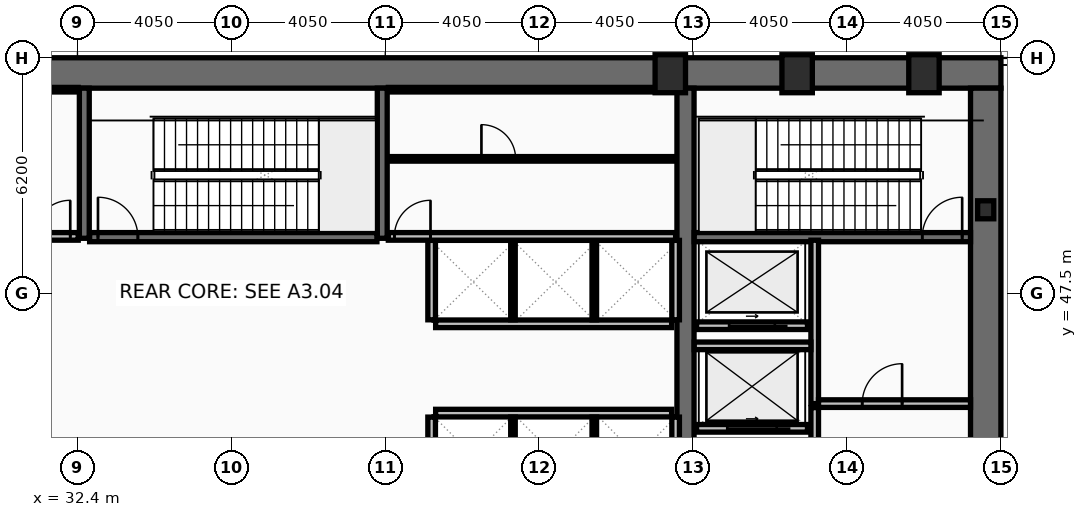
"""IFC4 building model, lengths in metres.
Left out: names, types, materials, properties, quantities, classifications, styles, units other than length and angle.
Written with IfcOpenShell. Run it as: python <this file> out.ifc"""

import sys

from ifc_helpers import new_model, si_unit, direction, frame, frame_2d, origin, origin_2d, place, context, subcontext, project, spatial, rectangle, hollow_rectangle, i_section, extrude, element, fill, save


model = new_model("IFC4")
c1 = context("Model", 3, precision=1e-05, world=origin(), true_north=direction((0.0, 1.0)))
c2 = subcontext(c1, "Body", "Model", "MODEL_VIEW")
j1 = project(units=[si_unit("LENGTHUNIT", "METRE"), si_unit("PLANEANGLEUNIT", "RADIAN")], contexts=[c1])
p1 = place(None, origin())
s1 = spatial("IfcSite", under=j1, at=p1, CompositionType="ELEMENT")
p2 = place(p1, origin())
s2 = spatial("IfcBuilding", under=s1, at=p2, CompositionType="ELEMENT")
p3 = place(p2, frame((0.0, 0.0, 20.4)))
s3 = spatial("IfcBuildingStorey", under=s2, at=p3, CompositionType="ELEMENT", Elevation=20.4)
p4 = place(p3, frame((16.2, 53.3, 0.0), z_axis=(0.0, 0.0, 1.0), x_axis=(1.0, 0.0, 0.0)))
e1 = element("IfcWall", 1, at=p4, inside=s3, PredefinedType="SHEAR", context=c2, shape_type="SweptSolid", body=[
    extrude(rectangle(XDim=40.5, YDim=0.8, at=frame_2d((20.25, 0.0))), origin(), (0.0, 0.0, 1.0), 5.22),
])
p5 = place(p3, frame((56.3, 52.9, 0.0), z_axis=(0.0, 0.0, 1.0), x_axis=(0.0, -1.0, 0.0)))
e2 = element("IfcWall", 2, at=p5, inside=s3, PredefinedType="SHEAR", context=c2, shape_type="SweptSolid", body=[
    extrude(rectangle(XDim=10.8, YDim=0.8, at=frame_2d((5.4, 0.0))), origin(), (0.0, 0.0, 1.0), 5.22),
])
p6 = place(p3, frame((48.4, 42.1, 0.0), z_axis=(0.0, 0.0, 1.0), x_axis=(0.0, 1.0, 0.0)))
e3 = element("IfcWall", 3, at=p6, inside=s3, PredefinedType="SHEAR", context=c2, shape_type="SweptSolid", body=[
    extrude(rectangle(XDim=10.8, YDim=0.45, at=frame_2d((5.4, 0.0))), origin(), (0.0, 0.0, 1.0), 5.22),
])
for number, where, z_axis, x_axis in (
    (4, (32.58, 48.95, 0.0), (0.0, 0.0, 1.0), (0.0, 1.0, 0.0)),
    (5, (40.42, 48.95, 0.0), (0.0, 0.0, 1.0), (0.0, 1.0, 0.0)),
):
    element("IfcWall", number, at=place(p3, frame(where, z_axis=z_axis, x_axis=x_axis)), inside=s3, PredefinedType="SHEAR", context=c2, shape_type="SweptSolid", body=[
        extrude(rectangle(XDim=3.95, YDim=0.26, at=frame_2d((1.975, 0.0))), origin(), (0.0, 0.0, 1.0), 5.22),
    ])
p7 = place(p3, frame((48.63, 48.98, 0.0), z_axis=(0.0, 0.0, 1.0), x_axis=(1.0, 0.0, 0.0)))
e6 = element("IfcWall", 6, at=p7, inside=s3, PredefinedType="SHEAR", context=c2, shape_type="SweptSolid", body=[
    extrude(rectangle(XDim=7.27, YDim=0.24, at=frame_2d((3.635, 0.0))), origin(), (0.0, 0.0, 1.0), 5.22),
])
p8 = place(p7, frame((6.0, 0.0, 0.0)))
e7 = element("IfcOpeningElement", 7, at=p8, cuts=e6, PredefinedType="OPENING", context=c2, shape_type="SweptSolid", body=[
    extrude(rectangle(XDim=1.05, YDim=2.15, at=frame_2d((0.525, 1.075))), frame((0.0, 0.13, 0.0), z_axis=(0.0, -1.0, 0.0), x_axis=(1.0, 0.0, 0.0)), (0.0, 0.0, 1.0), 0.26),
])
p9 = place(p3, frame((32.72, 48.98, 0.0), z_axis=(0.0, 0.0, 1.0), x_axis=(1.0, 0.0, 0.0)))
e8 = element("IfcWall", 8, at=p9, inside=s3, PredefinedType="SHEAR", context=c2, shape_type="SweptSolid", body=[
    extrude(rectangle(XDim=7.56, YDim=0.24, at=frame_2d((3.78, 0.0))), origin(), (0.0, 0.0, 1.0), 5.22),
])
p10 = place(p9, frame((0.22, 0.0, 0.0)))
e9 = element("IfcOpeningElement", 9, at=p10, cuts=e8, PredefinedType="OPENING", context=c2, shape_type="SweptSolid", body=[
    extrude(rectangle(XDim=1.05, YDim=2.15, at=frame_2d((0.525, 1.075))), frame((0.0, 0.13, 0.0), z_axis=(0.0, -1.0, 0.0), x_axis=(1.0, 0.0, 0.0)), (0.0, 0.0, 1.0), 0.26),
])
for number, where, z_axis, x_axis in (
    (10, (48.0, 53.28, 0.0), (0.0, 0.0, 1.0), (1.0, 0.0, 0.0)),
    (11, (51.337, 53.28, 0.0), (0.0, 0.0, 1.0), (1.0, 0.0, 0.0)),
    (12, (54.675, 53.28, 0.0), (0.0, 0.0, 1.0), (1.0, 0.0, 0.0)),
):
    element("IfcColumn", number, at=place(p3, frame(where, z_axis=z_axis, x_axis=x_axis)), inside=s3, PredefinedType="COLUMN", context=c2, shape_type="SweptSolid", body=[
        extrude(hollow_rectangle(XDim=0.8, YDim=1.0, WallThickness=0.055, at=origin_2d()), origin(), (0.0, 0.0, 1.0), 5.4),
    ])
p11 = place(p3, frame((56.3, 49.7, 0.0), z_axis=(0.0, 0.0, 1.0), x_axis=(1.0, 0.0, 0.0)))
e13 = element("IfcColumn", 13, at=p11, inside=s3, PredefinedType="COLUMN", context=c2, shape_type="SweptSolid", body=[
    extrude(i_section(OverallWidth=0.424, OverallDepth=0.474, WebThickness=0.048, FlangeThickness=0.077, at=origin_2d()), origin(), (0.0, 0.0, 1.0), 5.4),
])
p12 = place(p3, frame((51.61, 43.95, 0.0), z_axis=(0.0, 0.0, 1.0), x_axis=(-1.0, 0.0, 0.0)))
e14 = element("IfcWall", 14, at=p12, inside=s3, PredefinedType="PARTITIONING", context=c2, shape_type="SweptSolid", body=[
    extrude(rectangle(XDim=2.92, YDim=0.2, at=frame_2d((1.46, 0.0))), origin(), (0.0, 0.0, 1.0), 5.22),
])
p13 = place(p12, frame((0.81, 0.0, 0.0)))
e15 = element("IfcOpeningElement", 15, at=p13, cuts=e14, PredefinedType="OPENING", context=c2, shape_type="SweptSolid", body=[
    extrude(rectangle(XDim=1.3, YDim=2.18, at=frame_2d((0.65, 1.09))), frame((0.0, 0.11, 0.0), z_axis=(0.0, -1.0, 0.0), x_axis=(1.0, 0.0, 0.0)), (0.0, 0.0, 1.0), 0.22),
])
p14 = place(p3, frame((51.61, 46.65, 0.0), z_axis=(0.0, 0.0, 1.0), x_axis=(-1.0, 0.0, 0.0)))
e16 = element("IfcWall", 16, at=p14, inside=s3, PredefinedType="PARTITIONING", context=c2, shape_type="SweptSolid", body=[
    extrude(rectangle(XDim=2.92, YDim=0.2, at=frame_2d((1.46, 0.0))), origin(), (0.0, 0.0, 1.0), 5.22),
])
p15 = place(p14, frame((0.86, 0.0, 0.0)))
e17 = element("IfcOpeningElement", 17, at=p15, cuts=e16, PredefinedType="OPENING", context=c2, shape_type="SweptSolid", body=[
    extrude(rectangle(XDim=1.2, YDim=2.18, at=frame_2d((0.6, 1.09))), frame((0.0, 0.11, 0.0), z_axis=(0.0, -1.0, 0.0), x_axis=(1.0, 0.0, 0.0)), (0.0, 0.0, 1.0), 0.22),
])
p16 = place(p3, frame((51.8, 44.6, 0.0), z_axis=(0.0, 0.0, 1.0), x_axis=(0.0, 1.0, 0.0)))
e18 = element("IfcWall", 18, at=p16, inside=s3, PredefinedType="PARTITIONING", context=c2, shape_type="SweptSolid", body=[
    extrude(rectangle(XDim=4.3, YDim=0.2, at=frame_2d((2.15, 0.0))), origin(), (0.0, 0.0, 1.0), 5.22),
])
p17 = place(p3, frame((51.9, 44.6, 0.0), z_axis=(0.0, 0.0, 1.0), x_axis=(1.0, 0.0, 0.0)))
e19 = element("IfcWall", 19, at=p17, inside=s3, PredefinedType="PARTITIONING", context=c2, shape_type="SweptSolid", body=[
    extrude(rectangle(XDim=4.0, YDim=0.2, at=frame_2d((2.0, 0.0))), origin(), (0.0, 0.0, 1.0), 5.22),
])
p18 = place(p17, frame((1.15, 0.0, 0.0)))
e20 = element("IfcOpeningElement", 20, at=p18, cuts=e19, PredefinedType="OPENING", context=c2, shape_type="SweptSolid", body=[
    extrude(rectangle(XDim=1.05, YDim=2.15, at=frame_2d((0.525, 1.075))), frame((0.0, 0.11, 0.0), z_axis=(0.0, -1.0, 0.0), x_axis=(1.0, 0.0, 0.0)), (0.0, 0.0, 1.0), 0.22),
])
p19 = place(p3, frame((48.63, 46.12, 0.0), z_axis=(0.0, 0.0, 1.0), x_axis=(1.0, 0.0, 0.0)))
e21 = element("IfcWall", 21, at=p19, inside=s3, PredefinedType="PARTITIONING", context=c2, shape_type="SweptSolid", body=[
    extrude(rectangle(XDim=3.07, YDim=0.2, at=frame_2d((1.535, 0.0))), origin(), (0.0, 0.0, 1.0), 5.22),
])
p20 = place(p3, frame((51.8, 42.1, 0.0), z_axis=(0.0, 0.0, 1.0), x_axis=(0.0, 1.0, 0.0)))
e22 = element("IfcWall", 22, at=p20, inside=s3, PredefinedType="PARTITIONING", context=c2, shape_type="SweptSolid", body=[
    extrude(rectangle(XDim=2.395, YDim=0.2, at=frame_2d((1.198, 0.0))), origin(), (0.0, 0.0, 1.0), 5.22),
])
p21 = place(p20, frame((0.38, 0.0, 0.0)))
e23 = element("IfcOpeningElement", 23, at=p21, cuts=e22, PredefinedType="OPENING", context=c2, shape_type="SweptSolid", body=[
    extrude(rectangle(XDim=1.05, YDim=2.15, at=frame_2d((0.525, 1.075))), frame((0.0, 0.11, 0.0), z_axis=(0.0, -1.0, 0.0), x_axis=(1.0, 0.0, 0.0)), (0.0, 0.0, 1.0), 0.22),
])
p22 = place(p3, frame((41.825, 46.7, 0.0), z_axis=(0.0, 0.0, 1.0), x_axis=(1.0, 0.0, 0.0)))
e24 = element("IfcWall", 24, at=p22, inside=s3, PredefinedType="PARTITIONING", context=c2, shape_type="SweptSolid", body=[
    extrude(rectangle(XDim=6.21, YDim=0.2, at=frame_2d((3.105, 0.0))), origin(), (0.0, 0.0, 1.0), 5.22),
])
for number, where, z_axis, x_axis in (
    (25, (41.72, 46.805, 0.0), (0.0, 0.0, 1.0), (0.0, 1.0, 0.0)),
    (26, (48.14, 46.805, 0.0), (0.0, 0.0, 1.0), (0.0, 1.0, 0.0)),
):
    element("IfcWall", number, at=place(p3, frame(where, z_axis=z_axis, x_axis=x_axis)), inside=s3, PredefinedType="PARTITIONING", context=c2, shape_type="SweptSolid", body=[
        extrude(rectangle(XDim=2.09, YDim=0.2, at=frame_2d((1.045, 0.0))), origin(), (0.0, 0.0, 1.0), 5.22),
    ])
for number, where, z_axis, x_axis in (
    (27, (43.86, 46.805, 0.0), (0.0, 0.0, 1.0), (0.0, 1.0, 0.0)),
    (28, (46.0, 46.805, 0.0), (0.0, 0.0, 1.0), (0.0, 1.0, 0.0)),
):
    element("IfcWall", number, at=place(p3, frame(where, z_axis=z_axis, x_axis=x_axis)), inside=s3, PredefinedType="PARTITIONING", context=c2, shape_type="SweptSolid", body=[
        extrude(rectangle(XDim=2.09, YDim=0.12, at=frame_2d((1.045, 0.0))), origin(), (0.0, 0.0, 1.0), 5.22),
    ])
p23 = place(p3, frame((41.825, 44.35, 0.0), z_axis=(0.0, 0.0, 1.0), x_axis=(1.0, 0.0, 0.0)))
e29 = element("IfcWall", 29, at=p23, inside=s3, PredefinedType="PARTITIONING", context=c2, shape_type="SweptSolid", body=[
    extrude(rectangle(XDim=6.21, YDim=0.2, at=frame_2d((3.105, 0.0))), origin(), (0.0, 0.0, 1.0), 5.22),
])
for number, where, z_axis, x_axis in (
    (30, (41.72, 42.15, 0.0), (0.0, 0.0, 1.0), (0.0, 1.0, 0.0)),
    (31, (48.14, 42.15, 0.0), (0.0, 0.0, 1.0), (0.0, 1.0, 0.0)),
):
    element("IfcWall", number, at=place(p3, frame(where, z_axis=z_axis, x_axis=x_axis)), inside=s3, PredefinedType="PARTITIONING", context=c2, shape_type="SweptSolid", body=[
        extrude(rectangle(XDim=2.095, YDim=0.2, at=frame_2d((1.048, 0.0))), origin(), (0.0, 0.0, 1.0), 5.22),
    ])
for number, where, z_axis, x_axis in (
    (32, (43.86, 42.15, 0.0), (0.0, 0.0, 1.0), (0.0, 1.0, 0.0)),
    (33, (46.0, 42.15, 0.0), (0.0, 0.0, 1.0), (0.0, 1.0, 0.0)),
):
    element("IfcWall", number, at=place(p3, frame(where, z_axis=z_axis, x_axis=x_axis)), inside=s3, PredefinedType="PARTITIONING", context=c2, shape_type="SweptSolid", body=[
        extrude(rectangle(XDim=2.095, YDim=0.12, at=frame_2d((1.048, 0.0))), origin(), (0.0, 0.0, 1.0), 5.22),
    ])
p24 = place(p3, frame((24.7, 52.86, 0.0), z_axis=(0.0, 0.0, 1.0), x_axis=(1.0, 0.0, 0.0)))
e34 = element("IfcWall", 34, at=p24, inside=s3, PredefinedType="PARTITIONING", context=c2, shape_type="SweptSolid", body=[
    extrude(rectangle(XDim=7.72, YDim=0.12, at=frame_2d((3.86, 0.0))), origin(), (0.0, 0.0, 1.0), 5.22),
])
p25 = place(p3, frame((24.7, 49.0, 0.0), z_axis=(0.0, 0.0, 1.0), x_axis=(1.0, 0.0, 0.0)))
e35 = element("IfcWall", 35, at=p25, inside=s3, PredefinedType="PARTITIONING", context=c2, shape_type="SweptSolid", body=[
    extrude(rectangle(XDim=7.72, YDim=0.2, at=frame_2d((3.86, 0.0))), origin(), (0.0, 0.0, 1.0), 5.22),
])
p26 = place(p25, frame((6.56, 0.0, 0.0)))
e36 = element("IfcOpeningElement", 36, at=p26, cuts=e35, PredefinedType="OPENING", context=c2, shape_type="SweptSolid", body=[
    extrude(rectangle(XDim=0.95, YDim=2.1, at=frame_2d((0.475, 1.05))), frame((0.0, 0.11, 0.0), z_axis=(0.0, -1.0, 0.0), x_axis=(1.0, 0.0, 0.0)), (0.0, 0.0, 1.0), 0.22),
])
p27 = place(p3, frame((40.58, 52.86, 0.0), z_axis=(0.0, 0.0, 1.0), x_axis=(1.0, 0.0, 0.0)))
e37 = element("IfcWall", 37, at=p27, inside=s3, PredefinedType="PARTITIONING", context=c2, shape_type="SweptSolid", body=[
    extrude(rectangle(XDim=7.56, YDim=0.12, at=frame_2d((3.78, 0.0))), origin(), (0.0, 0.0, 1.0), 5.22),
])
p28 = place(p3, frame((40.58, 49.0, 0.0), z_axis=(0.0, 0.0, 1.0), x_axis=(1.0, 0.0, 0.0)))
e38 = element("IfcWall", 38, at=p28, inside=s3, PredefinedType="PARTITIONING", context=c2, shape_type="SweptSolid", body=[
    extrude(rectangle(XDim=7.56, YDim=0.2, at=frame_2d((3.78, 0.0))), origin(), (0.0, 0.0, 1.0), 5.22),
])
p29 = place(p28, frame((0.16, 0.0, 0.0)))
e39 = element("IfcOpeningElement", 39, at=p29, cuts=e38, PredefinedType="OPENING", context=c2, shape_type="SweptSolid", body=[
    extrude(rectangle(XDim=0.95, YDim=2.1, at=frame_2d((0.475, 1.05))), frame((0.0, 0.11, 0.0), z_axis=(0.0, -1.0, 0.0), x_axis=(1.0, 0.0, 0.0)), (0.0, 0.0, 1.0), 0.22),
])
p30 = place(p3, frame((40.63, 51.04, 0.0), z_axis=(0.0, 0.0, 1.0), x_axis=(1.0, 0.0, 0.0)))
e40 = element("IfcWall", 40, at=p30, inside=s3, PredefinedType="PARTITIONING", context=c2, shape_type="SweptSolid", body=[
    extrude(rectangle(XDim=7.46, YDim=0.12, at=frame_2d((3.73, 0.0))), origin(), (0.0, 0.0, 1.0), 5.22),
])
p31 = place(p30, frame((2.4, 0.0, 0.0)))
e41 = element("IfcOpeningElement", 41, at=p31, cuts=e40, PredefinedType="OPENING", context=c2, shape_type="SweptSolid", body=[
    extrude(rectangle(XDim=0.9, YDim=2.05, at=frame_2d((0.45, 1.025))), frame((0.0, 0.07, 0.0), z_axis=(0.0, -1.0, 0.0), x_axis=(1.0, 0.0, 0.0)), (0.0, 0.0, 1.0), 0.14),
])
p32 = place(p8, origin())
e42 = element("IfcDoor", 42, at=p32, inside=s3, OperationType="SINGLE_SWING_RIGHT", PredefinedType="DOOR", context=c2, shape_type="SweptSolid", body=[
    extrude(rectangle(XDim=1.05, YDim=2.15, at=frame_2d((0.525, 1.075))), frame((0.0, 0.025, 0.0), z_axis=(0.0, -1.0, 0.0), x_axis=(1.0, 0.0, 0.0)), (0.0, 0.0, 1.0), 0.05),
])
fill(e7, e42)
p33 = place(p10, origin())
e43 = element("IfcDoor", 43, at=p33, inside=s3, OperationType="SINGLE_SWING_LEFT", PredefinedType="DOOR", context=c2, shape_type="SweptSolid", body=[
    extrude(rectangle(XDim=1.05, YDim=2.15, at=frame_2d((0.525, 1.075))), frame((0.0, 0.025, 0.0), z_axis=(0.0, -1.0, 0.0), x_axis=(1.0, 0.0, 0.0)), (0.0, 0.0, 1.0), 0.05),
])
fill(e9, e43)
p34 = place(p13, origin())
e44 = element("IfcDoor", 44, at=p34, inside=s3, OperationType="SLIDING_TO_LEFT", PredefinedType="DOOR", context=c2, shape_type="SweptSolid", body=[
    extrude(rectangle(XDim=1.3, YDim=2.18, at=frame_2d((0.65, 1.09))), frame((0.0, 0.025, 0.0), z_axis=(0.0, -1.0, 0.0), x_axis=(1.0, 0.0, 0.0)), (0.0, 0.0, 1.0), 0.05),
])
fill(e15, e44)
p35 = place(p15, origin())
e45 = element("IfcDoor", 45, at=p35, inside=s3, OperationType="SLIDING_TO_LEFT", PredefinedType="DOOR", context=c2, shape_type="SweptSolid", body=[
    extrude(rectangle(XDim=1.2, YDim=2.18, at=frame_2d((0.6, 1.09))), frame((0.0, 0.025, 0.0), z_axis=(0.0, -1.0, 0.0), x_axis=(1.0, 0.0, 0.0)), (0.0, 0.0, 1.0), 0.05),
])
fill(e17, e45)
p36 = place(p18, origin())
e46 = element("IfcDoor", 46, at=p36, inside=s3, OperationType="SINGLE_SWING_RIGHT", PredefinedType="DOOR", context=c2, shape_type="SweptSolid", body=[
    extrude(rectangle(XDim=1.05, YDim=2.15, at=frame_2d((0.525, 1.075))), frame((0.0, 0.025, 0.0), z_axis=(0.0, -1.0, 0.0), x_axis=(1.0, 0.0, 0.0)), (0.0, 0.0, 1.0), 0.05),
])
fill(e20, e46)
p37 = place(p26, origin())
e47 = element("IfcDoor", 47, at=p37, inside=s3, OperationType="SINGLE_SWING_RIGHT", PredefinedType="DOOR", context=c2, shape_type="SweptSolid", body=[
    extrude(rectangle(XDim=0.95, YDim=2.1, at=frame_2d((0.475, 1.05))), frame((0.0, 0.025, 0.0), z_axis=(0.0, -1.0, 0.0), x_axis=(1.0, 0.0, 0.0)), (0.0, 0.0, 1.0), 0.05),
])
fill(e36, e47)
p38 = place(p29, origin())
e48 = element("IfcDoor", 48, at=p38, inside=s3, OperationType="SINGLE_SWING_RIGHT", PredefinedType="DOOR", context=c2, shape_type="SweptSolid", body=[
    extrude(rectangle(XDim=0.95, YDim=2.1, at=frame_2d((0.475, 1.05))), frame((0.0, 0.025, 0.0), z_axis=(0.0, -1.0, 0.0), x_axis=(1.0, 0.0, 0.0)), (0.0, 0.0, 1.0), 0.05),
])
fill(e39, e48)
p39 = place(p31, origin())
e49 = element("IfcDoor", 49, at=p39, inside=s3, OperationType="SINGLE_SWING_LEFT", PredefinedType="DOOR", context=c2, shape_type="SweptSolid", body=[
    extrude(rectangle(XDim=0.9, YDim=2.05, at=frame_2d((0.45, 1.025))), frame((0.0, 0.025, 0.0), z_axis=(0.0, -1.0, 0.0), x_axis=(1.0, 0.0, 0.0)), (0.0, 0.0, 1.0), 0.05),
])
fill(e41, e49)
save(model, sys.argv[1])
